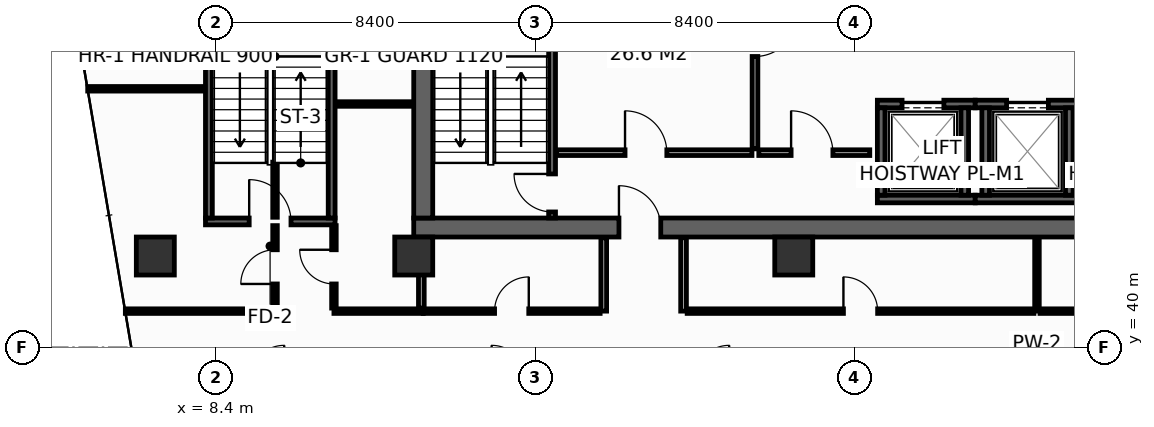
"""IFC4 building model, lengths in metres.
Left out: names, types, materials, properties, quantities, classifications, styles, units other than length and angle.
Written with IfcOpenShell. Run it as: python <this file> out.ifc"""

import sys

from ifc_helpers import new_model, si_unit, direction, frame, frame_2d, origin, origin_2d, place, context, subcontext, project, spatial, rectangle, hollow_rectangle, extrude, element, fill, save


model = new_model("IFC4")
c1 = context("Model", 3, precision=1e-05, world=origin(), true_north=direction((0.0, 1.0)))
c2 = subcontext(c1, "Body", "Model", "MODEL_VIEW")
j1 = project(units=[si_unit("LENGTHUNIT", "METRE"), si_unit("PLANEANGLEUNIT", "RADIAN")], contexts=[c1])
p1 = place(None, origin())
s1 = spatial("IfcSite", under=j1, at=p1, CompositionType="ELEMENT")
p2 = place(p1, origin())
s2 = spatial("IfcBuilding", under=s1, at=p2, CompositionType="ELEMENT")
p3 = place(p2, frame((0.0, 0.0, 179.0)))
s3 = spatial("IfcBuildingStorey", under=s2, at=p3, CompositionType="ELEMENT", Elevation=179.0)
p4 = place(p3, frame((13.6, 43.15, 0.0), z_axis=(0.0, 0.0, 1.0), x_axis=(1.0, 0.0, 0.0)))
e1 = element("IfcWall", 1, at=p4, inside=s3, PredefinedType="SHEAR", context=c2, shape_type="SweptSolid", body=[
    extrude(rectangle(XDim=32.7, YDim=0.5, at=frame_2d((16.35, 0.0))), origin(), (0.0, 0.0, 1.0), 3.55),
])
p5 = place(p4, frame((5.4, 0.0, 0.0)))
e2 = element("IfcOpeningElement", 2, at=p5, cuts=e1, PredefinedType="OPENING", context=c2, shape_type="SweptSolid", body=[
    extrude(rectangle(XDim=1.1, YDim=2.15, at=frame_2d((0.55, 1.075))), frame((0.0, 0.26, 0.0), z_axis=(0.0, -1.0, 0.0), x_axis=(1.0, 0.0, 0.0)), (0.0, 0.0, 1.0), 0.52),
])
p6 = place(p4, frame((25.6, 0.0, 0.0)))
e3 = element("IfcOpeningElement", 3, at=p6, cuts=e1, PredefinedType="OPENING", context=c2, shape_type="SweptSolid", body=[
    extrude(rectangle(XDim=1.1, YDim=2.15, at=frame_2d((0.55, 1.075))), frame((0.0, 0.26, 0.0), z_axis=(0.0, -1.0, 0.0), x_axis=(1.0, 0.0, 0.0)), (0.0, 0.0, 1.0), 0.52),
])
p7 = place(p3, frame((13.85, 43.4, 0.0), z_axis=(0.0, 0.0, 1.0), x_axis=(0.0, 1.0, 0.0)))
e4 = element("IfcWall", 4, at=p7, inside=s3, PredefinedType="SHEAR", context=c2, shape_type="SweptSolid", body=[
    extrude(rectangle(XDim=10.4, YDim=0.5, at=frame_2d((5.2, 0.0))), origin(), (0.0, 0.0, 1.0), 3.55),
])
for number, where, z_axis, x_axis in (
    (5, (6.8, 42.4, 0.0), (0.0, 0.0, 1.0), (1.0, 0.0, 0.0)),
    (6, (13.6, 42.4, 0.0), (0.0, 0.0, 1.0), (1.0, 0.0, 0.0)),
    (7, (23.6, 42.4, 0.0), (0.0, 0.0, 1.0), (1.0, 0.0, 0.0)),
):
    element("IfcColumn", number, at=place(p3, frame(where, z_axis=z_axis, x_axis=x_axis)), inside=s3, PredefinedType="COLUMN", context=c2, shape_type="SweptSolid", body=[
        extrude(hollow_rectangle(XDim=1.0, YDim=1.0, WallThickness=0.045, at=origin_2d()), origin(), (0.0, 0.0, 1.0), 3.8),
    ])
p8 = place(p3, frame((25.8, 43.9, 0.0), z_axis=(0.0, 0.0, 1.0), x_axis=(1.0, 0.0, 0.0)))
e8 = element("IfcWall", 8, at=p8, inside=s3, PredefinedType="SHEAR", context=c2, shape_type="SweptSolid", body=[
    extrude(rectangle(XDim=2.575, YDim=0.2, at=frame_2d((1.288, 0.0))), origin(), (0.0, 0.0, 1.0), 3.55),
])
p9 = place(p3, frame((25.8, 46.4, 0.0), z_axis=(0.0, 0.0, 1.0), x_axis=(1.0, 0.0, 0.0)))
e9 = element("IfcWall", 9, at=p9, inside=s3, PredefinedType="SHEAR", context=c2, shape_type="SweptSolid", body=[
    extrude(rectangle(XDim=2.575, YDim=0.2, at=frame_2d((1.288, 0.0))), origin(), (0.0, 0.0, 1.0), 3.55),
])
p10 = place(p9, frame((0.65, 0.0, 0.0)))
e10 = element("IfcOpeningElement", 10, at=p10, cuts=e9, PredefinedType="OPENING", context=c2, shape_type="SweptSolid", body=[
    extrude(rectangle(XDim=1.1, YDim=2.2, at=frame_2d((0.55, 1.1))), frame((0.0, 0.11, 0.0), z_axis=(0.0, -1.0, 0.0), x_axis=(1.0, 0.0, 0.0)), (0.0, 0.0, 1.0), 0.22),
])
for number, where, z_axis, x_axis in (
    (11, (25.9, 44.0, 0.0), (0.0, 0.0, 1.0), (0.0, 1.0, 0.0)),
    (12, (28.1, 44.0, 0.0), (0.0, 0.0, 1.0), (0.0, 1.0, 0.0)),
):
    element("IfcWall", number, at=place(p3, frame(where, z_axis=z_axis, x_axis=x_axis)), inside=s3, PredefinedType="SHEAR", context=c2, shape_type="SweptSolid", body=[
        extrude(rectangle(XDim=2.3, YDim=0.2, at=frame_2d((1.15, 0.0))), origin(), (0.0, 0.0, 1.0), 3.55),
    ])
p11 = place(p3, frame((28.375, 43.9, 0.0), z_axis=(0.0, 0.0, 1.0), x_axis=(1.0, 0.0, 0.0)))
e13 = element("IfcWall", 13, at=p11, inside=s3, PredefinedType="SHEAR", context=c2, shape_type="SweptSolid", body=[
    extrude(rectangle(XDim=2.75, YDim=0.2, at=frame_2d((1.375, 0.0))), origin(), (0.0, 0.0, 1.0), 3.55),
])
p12 = place(p3, frame((28.375, 46.4, 0.0), z_axis=(0.0, 0.0, 1.0), x_axis=(1.0, 0.0, 0.0)))
e14 = element("IfcWall", 14, at=p12, inside=s3, PredefinedType="SHEAR", context=c2, shape_type="SweptSolid", body=[
    extrude(rectangle(XDim=2.75, YDim=0.2, at=frame_2d((1.375, 0.0))), origin(), (0.0, 0.0, 1.0), 3.55),
])
p13 = place(p12, frame((0.825, 0.0, 0.0)))
e15 = element("IfcOpeningElement", 15, at=p13, cuts=e14, PredefinedType="OPENING", context=c2, shape_type="SweptSolid", body=[
    extrude(rectangle(XDim=1.1, YDim=2.2, at=frame_2d((0.55, 1.1))), frame((0.0, 0.11, 0.0), z_axis=(0.0, -1.0, 0.0), x_axis=(1.0, 0.0, 0.0)), (0.0, 0.0, 1.0), 0.22),
])
for number, where, z_axis, x_axis in (
    (16, (28.65, 44.0, 0.0), (0.0, 0.0, 1.0), (0.0, 1.0, 0.0)),
    (17, (30.85, 44.0, 0.0), (0.0, 0.0, 1.0), (0.0, 1.0, 0.0)),
):
    element("IfcWall", number, at=place(p3, frame(where, z_axis=z_axis, x_axis=x_axis)), inside=s3, PredefinedType="SHEAR", context=c2, shape_type="SweptSolid", body=[
        extrude(rectangle(XDim=2.3, YDim=0.2, at=frame_2d((1.15, 0.0))), origin(), (0.0, 0.0, 1.0), 3.55),
    ])
p14 = place(p3, frame((17.24, 43.4, 0.0), z_axis=(0.0, 0.0, 1.0), x_axis=(0.0, 1.0, 0.0)))
e18 = element("IfcWall", 18, at=p14, inside=s3, PredefinedType="SHEAR", context=c2, shape_type="SweptSolid", body=[
    extrude(rectangle(XDim=10.4, YDim=0.18, at=frame_2d((5.2, 0.0))), origin(), (0.0, 0.0, 1.0), 3.55),
])
p15 = place(p14, frame((0.16, 0.0, 0.0)))
e19 = element("IfcOpeningElement", 19, at=p15, cuts=e18, PredefinedType="OPENING", context=c2, shape_type="SweptSolid", body=[
    extrude(rectangle(XDim=1.0, YDim=2.15, at=frame_2d((0.5, 1.075))), frame((0.0, 0.1, 0.0), z_axis=(0.0, -1.0, 0.0), x_axis=(1.0, 0.0, 0.0)), (0.0, 0.0, 1.0), 0.2),
])
p16 = place(p3, frame((8.12, 43.31, 0.0), z_axis=(0.0, 0.0, 1.0), x_axis=(1.0, 0.0, 0.0)))
e20 = element("IfcWall", 20, at=p16, inside=s3, PredefinedType="SHEAR", context=c2, shape_type="SweptSolid", body=[
    extrude(rectangle(XDim=3.41, YDim=0.18, at=frame_2d((1.705, 0.0))), origin(), (0.0, 0.0, 1.0), 3.55),
])
p17 = place(p16, frame((1.15, 0.0, 0.0)))
e21 = element("IfcOpeningElement", 21, at=p17, cuts=e20, PredefinedType="OPENING", context=c2, shape_type="SweptSolid", body=[
    extrude(rectangle(XDim=1.1, YDim=2.15, at=frame_2d((0.55, 1.075))), frame((0.0, 0.1, 0.0), z_axis=(0.0, -1.0, 0.0), x_axis=(1.0, 0.0, 0.0)), (0.0, 0.0, 1.0), 0.2),
])
for number, where, z_axis, x_axis in (
    (22, (11.44, 43.4, 0.0), (0.0, 0.0, 1.0), (0.0, 1.0, 0.0)),
    (23, (8.21, 53.8, 0.0), (0.0, 0.0, 1.0), (0.0, -1.0, 0.0)),
):
    element("IfcWall", number, at=place(p3, frame(where, z_axis=z_axis, x_axis=x_axis)), inside=s3, PredefinedType="SHEAR", context=c2, shape_type="SweptSolid", body=[
        extrude(rectangle(XDim=10.4, YDim=0.18, at=frame_2d((5.2, 0.0))), origin(), (0.0, 0.0, 1.0), 3.55),
    ])
p18 = place(p3, frame((17.36, 45.12, 0.0), z_axis=(0.0, 0.0, 1.0), x_axis=(1.0, 0.0, 0.0)))
e24 = element("IfcWall", 24, at=p18, inside=s3, PredefinedType="PARTITIONING", context=c2, shape_type="SweptSolid", body=[
    extrude(rectangle(XDim=5.14, YDim=0.15, at=frame_2d((2.57, 0.0))), origin(), (0.0, 0.0, 1.0), 3.55),
])
p19 = place(p18, frame((1.8, 0.0, 0.0)))
e25 = element("IfcOpeningElement", 25, at=p19, cuts=e24, PredefinedType="OPENING", context=c2, shape_type="SweptSolid", body=[
    extrude(rectangle(XDim=1.1, YDim=2.15, at=frame_2d((0.55, 1.075))), frame((0.0, 0.085, 0.0), z_axis=(0.0, -1.0, 0.0), x_axis=(1.0, 0.0, 0.0)), (0.0, 0.0, 1.0), 0.17),
])
p20 = place(p3, frame((22.58, 50.55, 0.0), z_axis=(0.0, 0.0, 1.0), x_axis=(0.0, -1.0, 0.0)))
e26 = element("IfcWall", 26, at=p20, inside=s3, PredefinedType="PARTITIONING", context=c2, shape_type="SweptSolid", body=[
    extrude(rectangle(XDim=5.33, YDim=0.15, at=frame_2d((2.665, 0.0))), origin(), (0.0, 0.0, 1.0), 3.55),
])
p21 = place(p20, frame((1.8, 0.0, 0.0)))
e27 = element("IfcOpeningElement", 27, at=p21, cuts=e26, PredefinedType="OPENING", context=c2, shape_type="SweptSolid", body=[
    extrude(rectangle(XDim=1.1, YDim=2.15, at=frame_2d((0.55, 1.075))), frame((0.0, 0.085, 0.0), z_axis=(0.0, -1.0, 0.0), x_axis=(1.0, 0.0, 0.0)), (0.0, 0.0, 1.0), 0.17),
])
p22 = place(p3, frame((22.68, 45.12, 0.0), z_axis=(0.0, 0.0, 1.0), x_axis=(1.0, 0.0, 0.0)))
e28 = element("IfcWall", 28, at=p22, inside=s3, PredefinedType="PARTITIONING", context=c2, shape_type="SweptSolid", body=[
    extrude(rectangle(XDim=2.92, YDim=0.15, at=frame_2d((1.46, 0.0))), origin(), (0.0, 0.0, 1.0), 3.55),
])
p23 = place(p22, frame((0.85, 0.0, 0.0)))
e29 = element("IfcOpeningElement", 29, at=p23, cuts=e28, PredefinedType="OPENING", context=c2, shape_type="SweptSolid", body=[
    extrude(rectangle(XDim=1.1, YDim=2.15, at=frame_2d((0.55, 1.075))), frame((0.0, 0.085, 0.0), z_axis=(0.0, -1.0, 0.0), x_axis=(1.0, 0.0, 0.0)), (0.0, 0.0, 1.0), 0.17),
])
p24 = place(p3, frame((6.011, 40.95, 0.0), z_axis=(0.0, 0.0, 1.0), x_axis=(1.0, 0.0, 0.0)))
e30 = element("IfcWall", 30, at=p24, inside=s3, PredefinedType="PARTITIONING", context=c2, shape_type="SweptSolid", body=[
    extrude(rectangle(XDim=3.939, YDim=0.12, at=frame_2d((1.969, 0.0))), origin(), (0.0, 0.0, 1.0), 3.035),
])
p25 = place(p3, frame((11.5, 40.95, 0.0), z_axis=(0.0, 0.0, 1.0), x_axis=(1.0, 0.0, 0.0)))
e31 = element("IfcWall", 31, at=p25, inside=s3, PredefinedType="PARTITIONING", context=c2, shape_type="SweptSolid", body=[
    extrude(rectangle(XDim=2.35, YDim=0.12, at=frame_2d((1.175, 0.0))), origin(), (0.0, 0.0, 1.0), 3.55),
])
p26 = place(p3, frame((5.021, 46.8, 0.0), z_axis=(0.0, 0.0, 1.0), x_axis=(1.0, 0.0, 0.0)))
e32 = element("IfcWall", 32, at=p26, inside=s3, PredefinedType="PARTITIONING", context=c2, shape_type="SweptSolid", body=[
    extrude(rectangle(XDim=3.079, YDim=0.12, at=frame_2d((1.54, 0.0))), origin(), (0.0, 0.0, 1.0), 2.835),
])
p27 = place(p3, frame((9.95, 41.03, 0.0), z_axis=(0.0, 0.0, 1.0), x_axis=(0.0, 1.0, 0.0)))
e33 = element("IfcWall", 33, at=p27, inside=s3, PredefinedType="PARTITIONING", context=c2, shape_type="SweptSolid", body=[
    extrude(rectangle(XDim=2.17, YDim=0.12, at=frame_2d((1.085, 0.0))), origin(), (0.0, 0.0, 1.0), 2.835),
])
p28 = place(p27, frame((0.635, 0.0, 0.0)))
e34 = element("IfcOpeningElement", 34, at=p28, cuts=e33, PredefinedType="OPENING", context=c2, shape_type="SweptSolid", body=[
    extrude(rectangle(XDim=0.9, YDim=2.1, at=frame_2d((0.45, 1.05))), frame((0.0, 0.07, 0.0), z_axis=(0.0, -1.0, 0.0), x_axis=(1.0, 0.0, 0.0)), (0.0, 0.0, 1.0), 0.14),
])
p29 = place(p3, frame((9.95, 43.42, 0.0), z_axis=(0.0, 0.0, 1.0), x_axis=(0.0, 1.0, 0.0)))
e35 = element("IfcWall", 35, at=p29, inside=s3, PredefinedType="PARTITIONING", context=c2, shape_type="SweptSolid", body=[
    extrude(rectangle(XDim=1.45, YDim=0.12, at=frame_2d((0.725, 0.0))), origin(), (0.0, 0.0, 1.0), 3.55),
])
p30 = place(p3, frame((11.55, 46.4, 0.0), z_axis=(0.0, 0.0, 1.0), x_axis=(1.0, 0.0, 0.0)))
e36 = element("IfcWall", 36, at=p30, inside=s3, PredefinedType="PARTITIONING", context=c2, shape_type="SweptSolid", body=[
    extrude(rectangle(XDim=2.03, YDim=0.12, at=frame_2d((1.015, 0.0))), origin(), (0.0, 0.0, 1.0), 3.55),
])
p31 = place(p3, frame((11.5, 41.03, 0.0), z_axis=(0.0, 0.0, 1.0), x_axis=(0.0, 1.0, 0.0)))
e37 = element("IfcWall", 37, at=p31, inside=s3, PredefinedType="PARTITIONING", context=c2, shape_type="SweptSolid", body=[
    extrude(rectangle(XDim=2.17, YDim=0.12, at=frame_2d((1.085, 0.0))), origin(), (0.0, 0.0, 1.0), 2.835),
])
p32 = place(p31, frame((0.635, 0.0, 0.0)))
e38 = element("IfcOpeningElement", 38, at=p32, cuts=e37, PredefinedType="OPENING", context=c2, shape_type="SweptSolid", body=[
    extrude(rectangle(XDim=0.9, YDim=2.1, at=frame_2d((0.45, 1.05))), frame((0.0, 0.07, 0.0), z_axis=(0.0, -1.0, 0.0), x_axis=(1.0, 0.0, 0.0)), (0.0, 0.0, 1.0), 0.14),
])
p33 = place(p3, frame((13.8, 41.03, 0.0), z_axis=(0.0, 0.0, 1.0), x_axis=(0.0, 1.0, 0.0)))
e39 = element("IfcWall", 39, at=p33, inside=s3, PredefinedType="PARTITIONING", context=c2, shape_type="SweptSolid", body=[
    extrude(rectangle(XDim=1.85, YDim=0.15, at=frame_2d((0.925, 0.0))), origin(), (0.0, 0.0, 1.0), 3.55),
])
for number, where, z_axis, x_axis in (
    (40, (18.6, 40.95, 0.0), (0.0, 0.0, 1.0), (0.0, 1.0, 0.0)),
    (41, (20.7, 40.95, 0.0), (0.0, 0.0, 1.0), (0.0, 1.0, 0.0)),
):
    element("IfcWall", number, at=place(p3, frame(where, z_axis=z_axis, x_axis=x_axis)), inside=s3, PredefinedType="PARTITIONING", context=c2, shape_type="SweptSolid", body=[
        extrude(rectangle(XDim=1.93, YDim=0.15, at=frame_2d((0.965, 0.0))), origin(), (0.0, 0.0, 1.0), 3.55),
    ])
p34 = place(p3, frame((13.85, 40.95, 0.0), z_axis=(0.0, 0.0, 1.0), x_axis=(1.0, 0.0, 0.0)))
e42 = element("IfcWall", 42, at=p34, inside=s3, PredefinedType="PARTITIONING", context=c2, shape_type="SweptSolid", body=[
    extrude(rectangle(XDim=4.655, YDim=0.12, at=frame_2d((2.327, 0.0))), origin(), (0.0, 0.0, 1.0), 3.55),
])
p35 = place(p34, frame((1.877, 0.0, 0.0)))
e43 = element("IfcOpeningElement", 43, at=p35, cuts=e42, PredefinedType="OPENING", context=c2, shape_type="SweptSolid", body=[
    extrude(rectangle(XDim=0.9, YDim=2.1, at=frame_2d((0.45, 1.05))), frame((0.0, 0.07, 0.0), z_axis=(0.0, -1.0, 0.0), x_axis=(1.0, 0.0, 0.0)), (0.0, 0.0, 1.0), 0.14),
])
p36 = place(p3, frame((30.0, 40.95, 0.0), z_axis=(0.0, 0.0, 1.0), x_axis=(0.0, 1.0, 0.0)))
e44 = element("IfcWall", 44, at=p36, inside=s3, PredefinedType="PARTITIONING", context=c2, shape_type="SweptSolid", body=[
    extrude(rectangle(XDim=1.93, YDim=0.12, at=frame_2d((0.965, 0.0))), origin(), (0.0, 0.0, 1.0), 2.835),
])
p37 = place(p3, frame((20.795, 40.95, 0.0), z_axis=(0.0, 0.0, 1.0), x_axis=(1.0, 0.0, 0.0)))
e45 = element("IfcWall", 45, at=p37, inside=s3, PredefinedType="PARTITIONING", context=c2, shape_type="SweptSolid", body=[
    extrude(rectangle(XDim=9.125, YDim=0.12, at=frame_2d((4.562, 0.0))), origin(), (0.0, 0.0, 1.0), 2.835),
])
p38 = place(p37, frame((4.112, 0.0, 0.0)))
e46 = element("IfcOpeningElement", 46, at=p38, cuts=e45, PredefinedType="OPENING", context=c2, shape_type="SweptSolid", body=[
    extrude(rectangle(XDim=0.9, YDim=2.1, at=frame_2d((0.45, 1.05))), frame((0.0, 0.07, 0.0), z_axis=(0.0, -1.0, 0.0), x_axis=(1.0, 0.0, 0.0)), (0.0, 0.0, 1.0), 0.14),
])
p39 = place(p3, frame((30.08, 40.95, 0.0), z_axis=(0.0, 0.0, 1.0), x_axis=(1.0, 0.0, 0.0)))
e47 = element("IfcWall", 47, at=p39, inside=s3, PredefinedType="PARTITIONING", context=c2, shape_type="SweptSolid", body=[
    extrude(rectangle(XDim=8.625, YDim=0.12, at=frame_2d((4.312, 0.0))), origin(), (0.0, 0.0, 1.0), 2.835),
])
p40 = place(p39, frame((3.862, 0.0, 0.0)))
e48 = element("IfcOpeningElement", 48, at=p40, cuts=e47, PredefinedType="OPENING", context=c2, shape_type="SweptSolid", body=[
    extrude(rectangle(XDim=0.9, YDim=2.1, at=frame_2d((0.45, 1.05))), frame((0.0, 0.07, 0.0), z_axis=(0.0, -1.0, 0.0), x_axis=(1.0, 0.0, 0.0)), (0.0, 0.0, 1.0), 0.14),
])
p41 = place(p10, origin())
e49 = element("IfcDoor", 49, at=p41, inside=s3, OperationType="SLIDING_TO_LEFT", PredefinedType="DOOR", context=c2, shape_type="SweptSolid", body=[
    extrude(rectangle(XDim=1.1, YDim=2.2, at=frame_2d((0.55, 1.1))), frame((0.0, 0.025, 0.0), z_axis=(0.0, -1.0, 0.0), x_axis=(1.0, 0.0, 0.0)), (0.0, 0.0, 1.0), 0.05),
])
fill(e10, e49)
p42 = place(p13, origin())
e50 = element("IfcDoor", 50, at=p42, inside=s3, OperationType="SLIDING_TO_LEFT", PredefinedType="DOOR", context=c2, shape_type="SweptSolid", body=[
    extrude(rectangle(XDim=1.1, YDim=2.2, at=frame_2d((0.55, 1.1))), frame((0.0, 0.025, 0.0), z_axis=(0.0, -1.0, 0.0), x_axis=(1.0, 0.0, 0.0)), (0.0, 0.0, 1.0), 0.05),
])
fill(e15, e50)
p43 = place(p15, origin())
e51 = element("IfcDoor", 51, at=p43, inside=s3, OperationType="SINGLE_SWING_RIGHT", PredefinedType="DOOR", context=c2, shape_type="SweptSolid", body=[
    extrude(rectangle(XDim=1.0, YDim=2.15, at=frame_2d((0.5, 1.075))), frame((0.0, 0.025, 0.0), z_axis=(0.0, -1.0, 0.0), x_axis=(1.0, 0.0, 0.0)), (0.0, 0.0, 1.0), 0.05),
])
fill(e19, e51)
p44 = place(p17, origin())
e52 = element("IfcDoor", 52, at=p44, inside=s3, OperationType="SINGLE_SWING_LEFT", PredefinedType="DOOR", context=c2, shape_type="SweptSolid", body=[
    extrude(rectangle(XDim=1.1, YDim=2.15, at=frame_2d((0.55, 1.075))), frame((0.0, 0.025, 0.0), z_axis=(0.0, -1.0, 0.0), x_axis=(1.0, 0.0, 0.0)), (0.0, 0.0, 1.0), 0.05),
])
fill(e21, e52)
p45 = place(p19, origin())
e53 = element("IfcDoor", 53, at=p45, inside=s3, OperationType="SINGLE_SWING_LEFT", PredefinedType="DOOR", context=c2, shape_type="SweptSolid", body=[
    extrude(rectangle(XDim=1.1, YDim=2.15, at=frame_2d((0.55, 1.075))), frame((0.0, 0.025, 0.0), z_axis=(0.0, -1.0, 0.0), x_axis=(1.0, 0.0, 0.0)), (0.0, 0.0, 1.0), 0.05),
])
fill(e25, e53)
p46 = place(p21, origin())
e54 = element("IfcDoor", 54, at=p46, inside=s3, OperationType="SINGLE_SWING_LEFT", PredefinedType="DOOR", context=c2, shape_type="SweptSolid", body=[
    extrude(rectangle(XDim=1.1, YDim=2.15, at=frame_2d((0.55, 1.075))), frame((0.0, 0.025, 0.0), z_axis=(0.0, -1.0, 0.0), x_axis=(1.0, 0.0, 0.0)), (0.0, 0.0, 1.0), 0.05),
])
fill(e27, e54)
p47 = place(p23, origin())
e55 = element("IfcDoor", 55, at=p47, inside=s3, OperationType="SINGLE_SWING_LEFT", PredefinedType="DOOR", context=c2, shape_type="SweptSolid", body=[
    extrude(rectangle(XDim=1.1, YDim=2.15, at=frame_2d((0.55, 1.075))), frame((0.0, 0.025, 0.0), z_axis=(0.0, -1.0, 0.0), x_axis=(1.0, 0.0, 0.0)), (0.0, 0.0, 1.0), 0.05),
])
fill(e29, e55)
p48 = place(p5, origin())
e56 = element("IfcDoor", 56, at=p48, inside=s3, OperationType="SINGLE_SWING_LEFT", PredefinedType="DOOR", context=c2, shape_type="SweptSolid", body=[
    extrude(rectangle(XDim=1.1, YDim=2.15, at=frame_2d((0.55, 1.075))), frame((0.0, 0.025, 0.0), z_axis=(0.0, -1.0, 0.0), x_axis=(1.0, 0.0, 0.0)), (0.0, 0.0, 1.0), 0.05),
])
fill(e2, e56)
p49 = place(p28, origin())
e57 = element("IfcDoor", 57, at=p49, inside=s3, OperationType="SINGLE_SWING_LEFT", PredefinedType="DOOR", context=c2, shape_type="SweptSolid", body=[
    extrude(rectangle(XDim=0.9, YDim=2.1, at=frame_2d((0.45, 1.05))), frame((0.0, 0.025, 0.0), z_axis=(0.0, -1.0, 0.0), x_axis=(1.0, 0.0, 0.0)), (0.0, 0.0, 1.0), 0.05),
])
fill(e34, e57)
p50 = place(p32, origin())
e58 = element("IfcDoor", 58, at=p50, inside=s3, OperationType="SINGLE_SWING_RIGHT", PredefinedType="DOOR", context=c2, shape_type="SweptSolid", body=[
    extrude(rectangle(XDim=0.9, YDim=2.1, at=frame_2d((0.45, 1.05))), frame((0.0, 0.025, 0.0), z_axis=(0.0, -1.0, 0.0), x_axis=(1.0, 0.0, 0.0)), (0.0, 0.0, 1.0), 0.05),
])
fill(e38, e58)
p51 = place(p35, origin())
e59 = element("IfcDoor", 59, at=p51, inside=s3, OperationType="SINGLE_SWING_RIGHT", PredefinedType="DOOR", context=c2, shape_type="SweptSolid", body=[
    extrude(rectangle(XDim=0.9, YDim=2.1, at=frame_2d((0.45, 1.05))), frame((0.0, 0.025, 0.0), z_axis=(0.0, -1.0, 0.0), x_axis=(1.0, 0.0, 0.0)), (0.0, 0.0, 1.0), 0.05),
])
fill(e43, e59)
p52 = place(p38, origin())
e60 = element("IfcDoor", 60, at=p52, inside=s3, OperationType="SINGLE_SWING_LEFT", PredefinedType="DOOR", context=c2, shape_type="SweptSolid", body=[
    extrude(rectangle(XDim=0.9, YDim=2.1, at=frame_2d((0.45, 1.05))), frame((0.0, 0.025, 0.0), z_axis=(0.0, -1.0, 0.0), x_axis=(1.0, 0.0, 0.0)), (0.0, 0.0, 1.0), 0.05),
])
fill(e46, e60)
save(model, sys.argv[1])
